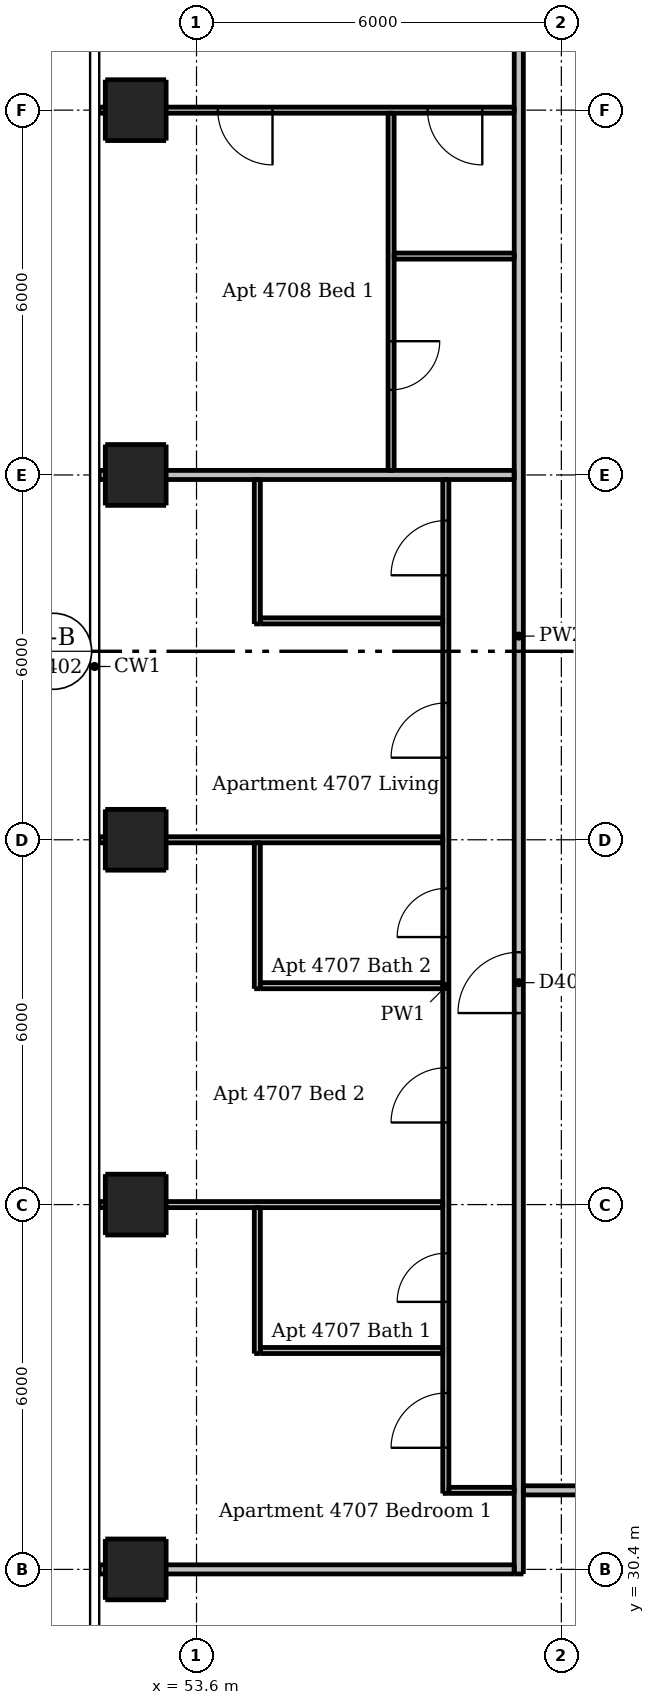
"""IFC4 building model, lengths in metres.
Left out: names, types, materials, properties, quantities, classifications, styles, units other than length and angle.
Written with IfcOpenShell. Run it as: python <this file> out.ifc"""

import sys

from ifc_helpers import new_model, si_unit, direction, frame, frame_2d, origin, origin_2d, place, context, subcontext, project, spatial, rectangle, extrude, element, fill, save


model = new_model("IFC4")
c1 = context("Model", 3, precision=1e-05, world=origin(), true_north=direction((0.0, 1.0)))
c2 = subcontext(c1, "Body", "Model", "MODEL_VIEW")
j1 = project(units=[si_unit("LENGTHUNIT", "METRE"), si_unit("PLANEANGLEUNIT", "RADIAN")], contexts=[c1])
p1 = place(None, origin())
s1 = spatial("IfcSite", under=j1, at=p1, CompositionType="ELEMENT")
p2 = place(p1, origin())
s2 = spatial("IfcBuilding", under=s1, at=p2, CompositionType="ELEMENT")
p3 = place(p2, frame((0.0, 0.0, 174.7)))
s3 = spatial("IfcBuildingStorey", under=s2, at=p3, CompositionType="ELEMENT", Elevation=174.7)
for number, where, z_axis, x_axis in (
    (1, (52.6, 30.4, 0.0), (0.0, 0.0, 1.0), (1.0, 0.0, 0.0)),
    (2, (52.6, 36.4, 0.0), (0.0, 0.0, 1.0), (1.0, 0.0, 0.0)),
    (3, (52.6, 42.4, 0.0), (0.0, 0.0, 1.0), (1.0, 0.0, 0.0)),
    (4, (52.6, 48.4, 0.0), (0.0, 0.0, 1.0), (1.0, 0.0, 0.0)),
    (5, (52.6, 54.4, 0.0), (0.0, 0.0, 1.0), (1.0, 0.0, 0.0)),
):
    element("IfcColumn", number, at=place(p3, frame(where, z_axis=z_axis, x_axis=x_axis)), inside=s3, PredefinedType="COLUMN", context=c2, shape_type="SweptSolid", body=[
        extrude(rectangle(XDim=1.0, YDim=1.0, at=origin_2d()), origin(), (0.0, 0.0, 1.0), 2.95),
    ])
for number, where, z_axis, x_axis in (
    (6, (54.6, 33.95, 0.0), (0.0, 0.0, 1.0), (0.0, 1.0, 0.0)),
    (7, (54.6, 39.95, 0.0), (0.0, 0.0, 1.0), (0.0, 1.0, 0.0)),
):
    element("IfcWall", number, at=place(p3, frame(where, z_axis=z_axis, x_axis=x_axis)), inside=s3, PredefinedType="PARTITIONING", context=c2, shape_type="SweptSolid", body=[
        extrude(rectangle(XDim=2.4, YDim=0.1, at=frame_2d((1.2, 0.0))), origin(), (0.0, 0.0, 1.0), 2.95),
    ])
p4 = place(p3, frame((54.6, 45.95, 0.0), z_axis=(0.0, 0.0, 1.0), x_axis=(0.0, 1.0, 0.0)))
e8 = element("IfcWall", 8, at=p4, inside=s3, PredefinedType="PARTITIONING", context=c2, shape_type="SweptSolid", body=[
    extrude(rectangle(XDim=2.375, YDim=0.1, at=frame_2d((1.188, 0.0))), origin(), (0.0, 0.0, 1.0), 2.95),
])
p5 = place(p3, frame((56.8, 54.35, 0.0), z_axis=(0.0, 0.0, 1.0), x_axis=(0.0, -1.0, 0.0)))
e9 = element("IfcWall", 9, at=p5, inside=s3, PredefinedType="PARTITIONING", context=c2, shape_type="SweptSolid", body=[
    extrude(rectangle(XDim=5.875, YDim=0.1, at=frame_2d((2.938, 0.0))), origin(), (0.0, 0.0, 1.0), 2.95),
])
p6 = place(p5, frame((3.75, 0.0, 0.0)))
e10 = element("IfcOpeningElement", 10, at=p6, cuts=e9, PredefinedType="OPENING", context=c2, shape_type="SweptSolid", body=[
    extrude(rectangle(XDim=0.8, YDim=2.1, at=frame_2d((0.4, 1.05))), frame((0.0, 0.06, 0.0), z_axis=(0.0, -1.0, 0.0), x_axis=(1.0, 0.0, 0.0)), (0.0, 0.0, 1.0), 0.12),
])
p7 = place(p3, frame((57.7, 31.65, 0.0), z_axis=(0.0, 0.0, 1.0), x_axis=(0.0, 1.0, 0.0)))
e11 = element("IfcWall", 11, at=p7, inside=s3, PredefinedType="PARTITIONING", context=c2, shape_type="SweptSolid", body=[
    extrude(rectangle(XDim=16.675, YDim=0.1, at=frame_2d((8.337, 0.0))), origin(), (0.0, 0.0, 1.0), 2.95),
])
p8 = place(p7, frame((12.1, 0.0, 0.0)))
e12 = element("IfcOpeningElement", 12, at=p8, cuts=e11, PredefinedType="OPENING", context=c2, shape_type="SweptSolid", body=[
    extrude(rectangle(XDim=0.9, YDim=2.1, at=frame_2d((0.45, 1.05))), frame((0.0, 0.06, 0.0), z_axis=(0.0, -1.0, 0.0), x_axis=(1.0, 0.0, 0.0)), (0.0, 0.0, 1.0), 0.12),
])
p9 = place(p7, frame((15.1, 0.0, 0.0)))
e13 = element("IfcOpeningElement", 13, at=p9, cuts=e11, PredefinedType="OPENING", context=c2, shape_type="SweptSolid", body=[
    extrude(rectangle(XDim=0.9, YDim=2.1, at=frame_2d((0.45, 1.05))), frame((0.0, 0.06, 0.0), z_axis=(0.0, -1.0, 0.0), x_axis=(1.0, 0.0, 0.0)), (0.0, 0.0, 1.0), 0.12),
])
p10 = place(p7, frame((0.75, 0.0, 0.0)))
e14 = element("IfcOpeningElement", 14, at=p10, cuts=e11, PredefinedType="OPENING", context=c2, shape_type="SweptSolid", body=[
    extrude(rectangle(XDim=0.9, YDim=2.1, at=frame_2d((0.45, 1.05))), frame((0.0, 0.06, 0.0), z_axis=(0.0, -1.0, 0.0), x_axis=(1.0, 0.0, 0.0)), (0.0, 0.0, 1.0), 0.12),
])
p11 = place(p7, frame((6.1, 0.0, 0.0)))
e15 = element("IfcOpeningElement", 15, at=p11, cuts=e11, PredefinedType="OPENING", context=c2, shape_type="SweptSolid", body=[
    extrude(rectangle(XDim=0.9, YDim=2.1, at=frame_2d((0.45, 1.05))), frame((0.0, 0.06, 0.0), z_axis=(0.0, -1.0, 0.0), x_axis=(1.0, 0.0, 0.0)), (0.0, 0.0, 1.0), 0.12),
])
p12 = place(p7, frame((3.15, 0.0, 0.0)))
e16 = element("IfcOpeningElement", 16, at=p12, cuts=e11, PredefinedType="OPENING", context=c2, shape_type="SweptSolid", body=[
    extrude(rectangle(XDim=0.8, YDim=2.1, at=frame_2d((0.4, 1.05))), frame((0.0, 0.06, 0.0), z_axis=(0.0, -1.0, 0.0), x_axis=(1.0, 0.0, 0.0)), (0.0, 0.0, 1.0), 0.12),
])
p13 = place(p7, frame((9.15, 0.0, 0.0)))
e17 = element("IfcOpeningElement", 17, at=p13, cuts=e11, PredefinedType="OPENING", context=c2, shape_type="SweptSolid", body=[
    extrude(rectangle(XDim=0.8, YDim=2.1, at=frame_2d((0.4, 1.05))), frame((0.0, 0.06, 0.0), z_axis=(0.0, -1.0, 0.0), x_axis=(1.0, 0.0, 0.0)), (0.0, 0.0, 1.0), 0.12),
])
p14 = place(p3, frame((58.825, 54.4, 0.0), z_axis=(0.0, 0.0, 1.0), x_axis=(-1.0, 0.0, 0.0)))
e18 = element("IfcWall", 18, at=p14, inside=s3, PredefinedType="PARTITIONING", context=c2, shape_type="SweptSolid", body=[
    extrude(rectangle(XDim=6.825, YDim=0.1, at=frame_2d((3.413, 0.0))), origin(), (0.0, 0.0, 1.0), 2.332),
])
p15 = place(p14, frame((0.525, 0.0, 0.0)))
e19 = element("IfcOpeningElement", 19, at=p15, cuts=e18, PredefinedType="OPENING", context=c2, shape_type="SweptSolid", body=[
    extrude(rectangle(XDim=0.9, YDim=2.1, at=frame_2d((0.45, 1.05))), frame((0.0, 0.06, 0.0), z_axis=(0.0, -1.0, 0.0), x_axis=(1.0, 0.0, 0.0)), (0.0, 0.0, 1.0), 0.12),
])
p16 = place(p14, frame((3.975, 0.0, 0.0)))
e20 = element("IfcOpeningElement", 20, at=p16, cuts=e18, PredefinedType="OPENING", context=c2, shape_type="SweptSolid", body=[
    extrude(rectangle(XDim=0.9, YDim=2.1, at=frame_2d((0.45, 1.05))), frame((0.0, 0.06, 0.0), z_axis=(0.0, -1.0, 0.0), x_axis=(1.0, 0.0, 0.0)), (0.0, 0.0, 1.0), 0.12),
])
p17 = place(p3, frame((56.85, 52.0, 0.0), z_axis=(0.0, 0.0, 1.0), x_axis=(1.0, 0.0, 0.0)))
e21 = element("IfcWall", 21, at=p17, inside=s3, PredefinedType="PARTITIONING", context=c2, shape_type="SweptSolid", body=[
    extrude(rectangle(XDim=1.975, YDim=0.1, at=frame_2d((0.987, 0.0))), origin(), (0.0, 0.0, 1.0), 2.95),
])
p18 = place(p3, frame((54.65, 46.0, 0.0), z_axis=(0.0, 0.0, 1.0), x_axis=(1.0, 0.0, 0.0)))
e22 = element("IfcWall", 22, at=p18, inside=s3, PredefinedType="PARTITIONING", context=c2, shape_type="SweptSolid", body=[
    extrude(rectangle(XDim=3.0, YDim=0.1, at=frame_2d((1.5, 0.0))), origin(), (0.0, 0.0, 1.0), 2.95),
])
p19 = place(p3, frame((52.0, 42.4, 0.0), z_axis=(0.0, 0.0, 1.0), x_axis=(1.0, 0.0, 0.0)))
e23 = element("IfcWall", 23, at=p19, inside=s3, PredefinedType="PARTITIONING", context=c2, shape_type="SweptSolid", body=[
    extrude(rectangle(XDim=5.65, YDim=0.1, at=frame_2d((2.825, 0.0))), origin(), (0.0, 0.0, 1.0), 2.332),
])
p20 = place(p3, frame((54.65, 40.0, 0.0), z_axis=(0.0, 0.0, 1.0), x_axis=(1.0, 0.0, 0.0)))
e24 = element("IfcWall", 24, at=p20, inside=s3, PredefinedType="PARTITIONING", context=c2, shape_type="SweptSolid", body=[
    extrude(rectangle(XDim=3.0, YDim=0.1, at=frame_2d((1.5, 0.0))), origin(), (0.0, 0.0, 1.0), 2.95),
])
p21 = place(p3, frame((52.0, 36.4, 0.0), z_axis=(0.0, 0.0, 1.0), x_axis=(1.0, 0.0, 0.0)))
e25 = element("IfcWall", 25, at=p21, inside=s3, PredefinedType="PARTITIONING", context=c2, shape_type="SweptSolid", body=[
    extrude(rectangle(XDim=5.65, YDim=0.1, at=frame_2d((2.825, 0.0))), origin(), (0.0, 0.0, 1.0), 2.332),
])
p22 = place(p3, frame((54.65, 34.0, 0.0), z_axis=(0.0, 0.0, 1.0), x_axis=(1.0, 0.0, 0.0)))
e26 = element("IfcWall", 26, at=p22, inside=s3, PredefinedType="PARTITIONING", context=c2, shape_type="SweptSolid", body=[
    extrude(rectangle(XDim=3.0, YDim=0.1, at=frame_2d((1.5, 0.0))), origin(), (0.0, 0.0, 1.0), 2.95),
])
p23 = place(p3, frame((57.75, 31.7, 0.0), z_axis=(0.0, 0.0, 1.0), x_axis=(1.0, 0.0, 0.0)))
e27 = element("IfcWall", 27, at=p23, inside=s3, PredefinedType="PARTITIONING", context=c2, shape_type="SweptSolid", body=[
    extrude(rectangle(XDim=1.075, YDim=0.1, at=frame_2d((0.538, 0.0))), origin(), (0.0, 0.0, 1.0), 2.95),
])
p24 = place(p3, frame((58.9, 30.325, 0.0), z_axis=(0.0, 0.0, 1.0), x_axis=(0.0, 1.0, 0.0)))
e28 = element("IfcWall", 28, at=p24, inside=s3, PredefinedType="PARTITIONING", context=c2, shape_type="SweptSolid", body=[
    extrude(rectangle(XDim=30.85, YDim=0.15, at=frame_2d((15.425, 0.0))), origin(), (0.0, 0.0, 1.0), 2.95),
])
p25 = place(p24, frame((9.225, 0.0, 0.0)))
e29 = element("IfcOpeningElement", 29, at=p25, cuts=e28, PredefinedType="OPENING", context=c2, shape_type="SweptSolid", body=[
    extrude(rectangle(XDim=1.0, YDim=2.1, at=frame_2d((0.5, 1.05))), frame((0.0, 0.085, 0.0), z_axis=(0.0, -1.0, 0.0), x_axis=(1.0, 0.0, 0.0)), (0.0, 0.0, 1.0), 0.17),
])
p26 = place(p24, frame((26.925, 0.0, 0.0)))
e30 = element("IfcOpeningElement", 30, at=p26, cuts=e28, PredefinedType="OPENING", context=c2, shape_type="SweptSolid", body=[
    extrude(rectangle(XDim=1.0, YDim=2.1, at=frame_2d((0.5, 1.05))), frame((0.0, 0.085, 0.0), z_axis=(0.0, -1.0, 0.0), x_axis=(1.0, 0.0, 0.0)), (0.0, 0.0, 1.0), 0.17),
])
p27 = place(p3, frame((52.0, 48.4, 0.0), z_axis=(0.0, 0.0, 1.0), x_axis=(1.0, 0.0, 0.0)))
e31 = element("IfcWall", 31, at=p27, inside=s3, PredefinedType="PARTITIONING", context=c2, shape_type="SweptSolid", body=[
    extrude(rectangle(XDim=6.825, YDim=0.15, at=frame_2d((3.413, 0.0))), origin(), (0.0, 0.0, 1.0), 2.332),
])
p28 = place(p3, frame((89.525, 31.7, 0.0), z_axis=(0.0, 0.0, 1.0), x_axis=(-1.0, 0.0, 0.0)))
e32 = element("IfcWall", 32, at=p28, inside=s3, PredefinedType="PARTITIONING", context=c2, shape_type="SweptSolid", body=[
    extrude(rectangle(XDim=30.55, YDim=0.15, at=frame_2d((15.275, 0.0))), origin(), (0.0, 0.0, 1.0), 2.95),
])
p29 = place(p28, frame((26.775, 0.0, 0.0)))
e33 = element("IfcOpeningElement", 33, at=p29, cuts=e32, PredefinedType="OPENING", context=c2, shape_type="SweptSolid", body=[
    extrude(rectangle(XDim=1.0, YDim=2.1, at=frame_2d((0.5, 1.05))), frame((0.0, 0.085, 0.0), z_axis=(0.0, -1.0, 0.0), x_axis=(1.0, 0.0, 0.0)), (0.0, 0.0, 1.0), 0.17),
])
p30 = place(p28, frame((8.425, 0.0, 0.0)))
e34 = element("IfcOpeningElement", 34, at=p30, cuts=e32, PredefinedType="OPENING", context=c2, shape_type="SweptSolid", body=[
    extrude(rectangle(XDim=1.0, YDim=2.1, at=frame_2d((0.5, 1.05))), frame((0.0, 0.085, 0.0), z_axis=(0.0, -1.0, 0.0), x_axis=(1.0, 0.0, 0.0)), (0.0, 0.0, 1.0), 0.17),
])
p31 = place(p3, frame((52.0, 30.4, 0.0), z_axis=(0.0, 0.0, 1.0), x_axis=(1.0, 0.0, 0.0)))
e35 = element("IfcWall", 35, at=p31, inside=s3, PredefinedType="PARTITIONING", context=c2, shape_type="SweptSolid", body=[
    extrude(rectangle(XDim=6.825, YDim=0.15, at=frame_2d((3.413, 0.0))), origin(), (0.0, 0.0, 1.0), 2.332),
])
p32 = place(p25, origin())
e36 = element("IfcDoor", 36, at=p32, inside=s3, OperationType="SINGLE_SWING_LEFT", PredefinedType="DOOR", context=c2, shape_type="SweptSolid", body=[
    extrude(rectangle(XDim=1.0, YDim=2.1, at=frame_2d((0.5, 1.05))), frame((0.0, 0.025, 0.0), z_axis=(0.0, -1.0, 0.0), x_axis=(1.0, 0.0, 0.0)), (0.0, 0.0, 1.0), 0.05),
])
fill(e29, e36)
p33 = place(p8, origin())
e37 = element("IfcDoor", 37, at=p33, inside=s3, OperationType="SINGLE_SWING_LEFT", PredefinedType="DOOR", context=c2, shape_type="SweptSolid", body=[
    extrude(rectangle(XDim=0.9, YDim=2.1, at=frame_2d((0.45, 1.05))), frame((0.0, 0.025, 0.0), z_axis=(0.0, -1.0, 0.0), x_axis=(1.0, 0.0, 0.0)), (0.0, 0.0, 1.0), 0.05),
])
fill(e12, e37)
p34 = place(p9, origin())
e38 = element("IfcDoor", 38, at=p34, inside=s3, OperationType="SINGLE_SWING_LEFT", PredefinedType="DOOR", context=c2, shape_type="SweptSolid", body=[
    extrude(rectangle(XDim=0.9, YDim=2.1, at=frame_2d((0.45, 1.05))), frame((0.0, 0.025, 0.0), z_axis=(0.0, -1.0, 0.0), x_axis=(1.0, 0.0, 0.0)), (0.0, 0.0, 1.0), 0.05),
])
fill(e13, e38)
p35 = place(p10, origin())
e39 = element("IfcDoor", 39, at=p35, inside=s3, OperationType="SINGLE_SWING_LEFT", PredefinedType="DOOR", context=c2, shape_type="SweptSolid", body=[
    extrude(rectangle(XDim=0.9, YDim=2.1, at=frame_2d((0.45, 1.05))), frame((0.0, 0.025, 0.0), z_axis=(0.0, -1.0, 0.0), x_axis=(1.0, 0.0, 0.0)), (0.0, 0.0, 1.0), 0.05),
])
fill(e14, e39)
p36 = place(p11, origin())
e40 = element("IfcDoor", 40, at=p36, inside=s3, OperationType="SINGLE_SWING_LEFT", PredefinedType="DOOR", context=c2, shape_type="SweptSolid", body=[
    extrude(rectangle(XDim=0.9, YDim=2.1, at=frame_2d((0.45, 1.05))), frame((0.0, 0.025, 0.0), z_axis=(0.0, -1.0, 0.0), x_axis=(1.0, 0.0, 0.0)), (0.0, 0.0, 1.0), 0.05),
])
fill(e15, e40)
p37 = place(p12, origin())
e41 = element("IfcDoor", 41, at=p37, inside=s3, OperationType="SINGLE_SWING_LEFT", PredefinedType="DOOR", context=c2, shape_type="SweptSolid", body=[
    extrude(rectangle(XDim=0.8, YDim=2.1, at=frame_2d((0.4, 1.05))), frame((0.0, 0.025, 0.0), z_axis=(0.0, -1.0, 0.0), x_axis=(1.0, 0.0, 0.0)), (0.0, 0.0, 1.0), 0.05),
])
fill(e16, e41)
p38 = place(p13, origin())
e42 = element("IfcDoor", 42, at=p38, inside=s3, OperationType="SINGLE_SWING_LEFT", PredefinedType="DOOR", context=c2, shape_type="SweptSolid", body=[
    extrude(rectangle(XDim=0.8, YDim=2.1, at=frame_2d((0.4, 1.05))), frame((0.0, 0.025, 0.0), z_axis=(0.0, -1.0, 0.0), x_axis=(1.0, 0.0, 0.0)), (0.0, 0.0, 1.0), 0.05),
])
fill(e17, e42)
p39 = place(p15, origin())
e43 = element("IfcDoor", 43, at=p39, inside=s3, OperationType="SINGLE_SWING_LEFT", PredefinedType="DOOR", context=c2, shape_type="SweptSolid", body=[
    extrude(rectangle(XDim=0.9, YDim=2.1, at=frame_2d((0.45, 1.05))), frame((0.0, 0.025, 0.0), z_axis=(0.0, -1.0, 0.0), x_axis=(1.0, 0.0, 0.0)), (0.0, 0.0, 1.0), 0.05),
])
fill(e19, e43)
p40 = place(p16, origin())
e44 = element("IfcDoor", 44, at=p40, inside=s3, OperationType="SINGLE_SWING_LEFT", PredefinedType="DOOR", context=c2, shape_type="SweptSolid", body=[
    extrude(rectangle(XDim=0.9, YDim=2.1, at=frame_2d((0.45, 1.05))), frame((0.0, 0.025, 0.0), z_axis=(0.0, -1.0, 0.0), x_axis=(1.0, 0.0, 0.0)), (0.0, 0.0, 1.0), 0.05),
])
fill(e20, e44)
p41 = place(p6, origin())
e45 = element("IfcDoor", 45, at=p41, inside=s3, OperationType="SINGLE_SWING_LEFT", PredefinedType="DOOR", context=c2, shape_type="SweptSolid", body=[
    extrude(rectangle(XDim=0.8, YDim=2.1, at=frame_2d((0.4, 1.05))), frame((0.0, 0.025, 0.0), z_axis=(0.0, -1.0, 0.0), x_axis=(1.0, 0.0, 0.0)), (0.0, 0.0, 1.0), 0.05),
])
fill(e10, e45)
save(model, sys.argv[1])
